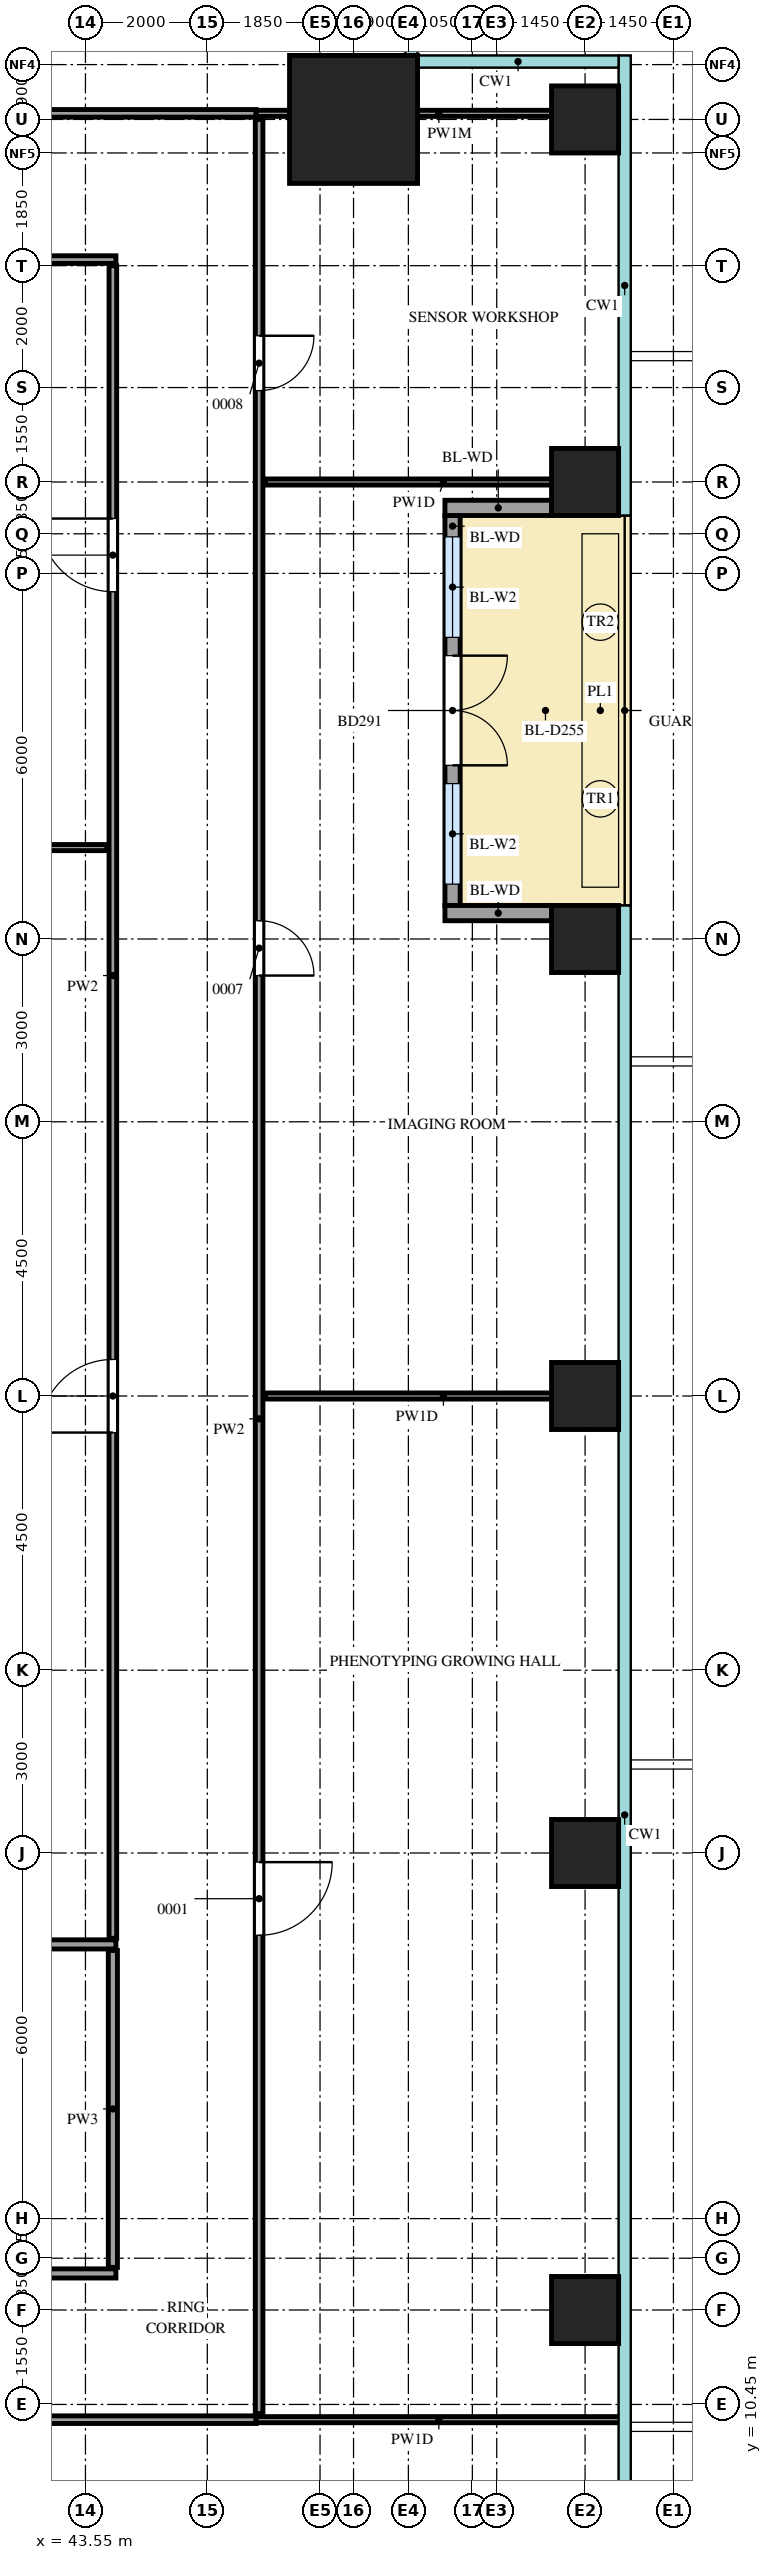
"""IFC4 building model, lengths in metres.
Left out: names, types, materials, properties, quantities, classifications, styles, units other than length and angle.
Written with IfcOpenShell. Run it as: python <this file> out.ifc"""

import sys

from ifc_helpers import new_model, si_unit, direction, frame, frame_2d, origin, origin_2d, place, context, subcontext, project, spatial, rectangle, extrude, source, transform, mapped, element, fill, save


model = new_model("IFC4")
c1 = context("Model", 3, precision=1e-05, world=origin(), true_north=direction((0.0, 1.0)))
c2 = subcontext(c1, "Body", "Model", "MODEL_VIEW")
j1 = project(units=[si_unit("LENGTHUNIT", "METRE"), si_unit("PLANEANGLEUNIT", "RADIAN")], contexts=[c1])
p1 = place(None, origin())
s1 = spatial("IfcSite", under=j1, at=p1, CompositionType="ELEMENT")
p2 = place(p1, origin())
s2 = spatial("IfcBuilding", under=s1, at=p2, CompositionType="ELEMENT")
p3 = place(p2, frame((0.0, 0.0, 136.7)))
s3 = spatial("IfcBuildingStorey", under=s2, at=p3, CompositionType="ELEMENT", Elevation=136.7)
m1 = source(origin(), c2, "Body", "SweptSolid", [
    extrude(rectangle(XDim=2.1, YDim=2.1, at=origin_2d()), origin(), (0.0, 0.0, 1.0), 4.4),
])
p4 = place(p3, frame((47.95, 47.95, 0.0), z_axis=(0.0, 0.0, 1.0), x_axis=(1.0, 0.0, 0.0)))
e1 = element("IfcColumn", 1, at=p4, inside=s3, PredefinedType="COLUMN", context=c2, shape_type="MappedRepresentation", body=[
    mapped(m1, transform((0.0, 0.0, 0.0))),
])
m2 = source(origin(), c2, "Body", "SweptSolid", [
    extrude(rectangle(XDim=1.1, YDim=1.1, at=origin_2d()), origin(), (0.0, 0.0, 1.0), 4.1),
])
for number, where, z_axis, x_axis in (
    (2, (51.75, 12.0, 0.0), (0.0, 0.0, 1.0), (1.0, 0.0, 0.0)),
    (3, (51.75, 19.5, 0.0), (0.0, 0.0, 1.0), (1.0, 0.0, 0.0)),
    (4, (51.75, 27.0, 0.0), (0.0, 0.0, 1.0), (1.0, 0.0, 0.0)),
    (5, (51.75, 34.5, 0.0), (0.0, 0.0, 1.0), (1.0, 0.0, 0.0)),
    (6, (51.75, 42.0, 0.0), (0.0, 0.0, 1.0), (1.0, 0.0, 0.0)),
    (7, (51.75, 47.95, 0.0), (0.0, 0.0, 1.0), (1.0, 0.0, 0.0)),
):
    element("IfcColumn", number, at=place(p3, frame(where, z_axis=z_axis, x_axis=x_axis)), inside=s3, PredefinedType="COLUMN", context=c2, shape_type="MappedRepresentation", body=[
        mapped(m2, transform((0.0, 0.0, 0.0))),
    ])
m3 = source(origin(), c2, "Body", "SweptSolid", [
    extrude(rectangle(XDim=6.4, YDim=0.25, at=frame_2d((3.2, 0.0))), origin(), (0.0, 0.0, 1.0), 3.55),
])
p5 = place(p3, frame((49.575, 35.05, 0.0), z_axis=(0.0, 0.0, 1.0), x_axis=(0.0, 1.0, 0.0)))
e8 = element("IfcWall", 8, at=p5, inside=s3, PredefinedType="SOLIDWALL", context=c2, shape_type="MappedRepresentation", body=[
    mapped(m3, transform((0.0, 0.0, 0.0))),
])
m4 = source(origin(), c2, "Body", "SweptSolid", [
    extrude(rectangle(XDim=1.65, YDim=2.4, at=frame_2d((0.825, 1.2))), frame((0.0, 0.135, 0.0), z_axis=(0.0, -1.0, 0.0), x_axis=(1.0, 0.0, 0.0)), (0.0, 0.0, 1.0), 0.27),
])
p6 = place(p5, frame((0.35, 0.0, 0.0)))
e9 = element("IfcOpeningElement", 9, at=p6, cuts=e8, PredefinedType="OPENING", context=c2, shape_type="MappedRepresentation", body=[
    mapped(m4, transform((0.0, 0.0, 0.0))),
])
p7 = place(p5, frame((4.4, 0.0, 0.0)))
e10 = element("IfcOpeningElement", 10, at=p7, cuts=e8, PredefinedType="OPENING", context=c2, shape_type="MappedRepresentation", body=[
    mapped(m4, transform((0.0, 0.0, 0.0))),
])
m5 = source(origin(), c2, "Body", "SweptSolid", [
    extrude(rectangle(XDim=1.8, YDim=2.4, at=frame_2d((0.9, 1.2))), frame((0.0, 0.135, 0.0), z_axis=(0.0, -1.0, 0.0), x_axis=(1.0, 0.0, 0.0)), (0.0, 0.0, 1.0), 0.27),
])
p8 = place(p5, frame((2.3, 0.0, 0.0)))
e11 = element("IfcOpeningElement", 11, at=p8, cuts=e8, PredefinedType="OPENING", context=c2, shape_type="MappedRepresentation", body=[
    mapped(m5, transform((0.0, 0.0, 0.0))),
])
m6 = source(origin(), c2, "Body", "SweptSolid", [
    extrude(rectangle(XDim=1.75, YDim=0.25, at=frame_2d((0.875, 0.0))), origin(), (0.0, 0.0, 1.0), 3.55),
])
for number, where, z_axis, x_axis in (
    (12, (51.2, 34.925, 0.0), (0.0, 0.0, 1.0), (-1.0, 0.0, 0.0)),
    (13, (51.2, 41.575, 0.0), (0.0, 0.0, 1.0), (-1.0, 0.0, 0.0)),
):
    element("IfcWall", number, at=place(p3, frame(where, z_axis=z_axis, x_axis=x_axis)), inside=s3, PredefinedType="SOLIDWALL", context=c2, shape_type="MappedRepresentation", body=[
        mapped(m6, transform((0.0, 0.0, 0.0))),
    ])
m7 = source(origin(), c2, "Body", "SweptSolid", [
    extrude(rectangle(XDim=20.0, YDim=0.125, at=frame_2d((10.0, 0.0))), origin(), (0.0, 0.0, 1.0), 4.2),
])
p9 = place(p3, frame((26.35, 10.2, 0.0), z_axis=(0.0, 0.0, 1.0), x_axis=(1.0, 0.0, 0.0)))
e14 = element("IfcWall", 14, at=p9, inside=s3, PredefinedType="PARTITIONING", context=c2, shape_type="MappedRepresentation", body=[
    mapped(m7, transform((0.0, 0.0, 0.0))),
])
m8 = source(origin(), c2, "Body", "SweptSolid", [
    extrude(rectangle(XDim=1.2, YDim=2.1, at=frame_2d((0.6, 1.05))), frame((0.0, 0.073, 0.0), z_axis=(0.0, -1.0, 0.0), x_axis=(1.0, 0.0, 0.0)), (0.0, 0.0, 1.0), 0.145),
])
p10 = place(p9, frame((3.5, 0.0, 0.0)))
e15 = element("IfcOpeningElement", 15, at=p10, cuts=e14, PredefinedType="OPENING", context=c2, shape_type="MappedRepresentation", body=[
    mapped(m8, transform((0.0, 0.0, 0.0))),
])
p11 = place(p9, frame((12.3, 0.0, 0.0)))
e16 = element("IfcOpeningElement", 16, at=p11, cuts=e14, PredefinedType="OPENING", context=c2, shape_type="MappedRepresentation", body=[
    mapped(m8, transform((0.0, 0.0, 0.0))),
])
m9 = source(origin(), c2, "Body", "SweptSolid", [
    extrude(rectangle(XDim=6.0, YDim=0.1, at=frame_2d((3.0, 0.0))), origin(), (0.0, 0.0, 1.0), 4.2),
])
p12 = place(p3, frame((46.35, 10.2, 0.0), z_axis=(0.0, 0.0, 1.0), x_axis=(1.0, 0.0, 0.0)))
e17 = element("IfcWall", 17, at=p12, inside=s3, PredefinedType="PARTITIONING", context=c2, shape_type="MappedRepresentation", body=[
    mapped(m9, transform((0.0, 0.0, 0.0))),
])
m10 = source(origin(), c2, "Body", "SweptSolid", [
    extrude(rectangle(XDim=37.65, YDim=0.125, at=frame_2d((18.825, 0.0))), origin(), (0.0, 0.0, 1.0), 4.2),
])
p13 = place(p3, frame((46.4, 10.3, 0.0), z_axis=(0.0, 0.0, 1.0), x_axis=(0.0, 1.0, 0.0)))
e18 = element("IfcWall", 18, at=p13, inside=s3, PredefinedType="PARTITIONING", context=c2, shape_type="MappedRepresentation", body=[
    mapped(m10, transform((0.0, 0.0, 0.0))),
])
p14 = place(p13, frame((7.85, 0.0, 0.0)))
e19 = element("IfcOpeningElement", 19, at=p14, cuts=e18, PredefinedType="OPENING", context=c2, shape_type="MappedRepresentation", body=[
    mapped(m8, transform((0.0, 0.0, 0.0))),
])
m11 = source(origin(), c2, "Body", "SweptSolid", [
    extrude(rectangle(XDim=0.9, YDim=2.1, at=frame_2d((0.45, 1.05))), frame((0.0, 0.073, 0.0), z_axis=(0.0, -1.0, 0.0), x_axis=(1.0, 0.0, 0.0)), (0.0, 0.0, 1.0), 0.145),
])
p15 = place(p13, frame((23.6, 0.0, 0.0)))
e20 = element("IfcOpeningElement", 20, at=p15, cuts=e18, PredefinedType="OPENING", context=c2, shape_type="MappedRepresentation", body=[
    mapped(m11, transform((0.0, 0.0, 0.0))),
])
p16 = place(p13, frame((33.2, 0.0, 0.0)))
e21 = element("IfcOpeningElement", 21, at=p16, cuts=e18, PredefinedType="OPENING", context=c2, shape_type="MappedRepresentation", body=[
    mapped(m11, transform((0.0, 0.0, 0.0))),
])
m12 = source(origin(), c2, "Body", "SweptSolid", [
    extrude(rectangle(XDim=17.7, YDim=0.15, at=frame_2d((8.85, 0.0))), origin(), (0.0, 0.0, 1.0), 4.2),
])
p17 = place(p3, frame((26.35, 12.6, 0.0), z_axis=(0.0, 0.0, 1.0), x_axis=(1.0, 0.0, 0.0)))
e22 = element("IfcWall", 22, at=p17, inside=s3, PredefinedType="PARTITIONING", context=c2, shape_type="MappedRepresentation", body=[
    mapped(m12, transform((0.0, 0.0, 0.0))),
])
m13 = source(origin(), c2, "Body", "SweptSolid", [
    extrude(rectangle(XDim=5.2, YDim=0.15, at=frame_2d((2.6, 0.0))), origin(), (0.0, 0.0, 1.0), 4.2),
])
p18 = place(p3, frame((44.0, 12.7, 0.0), z_axis=(0.0, 0.0, 1.0), x_axis=(0.0, 1.0, 0.0)))
e23 = element("IfcWall", 23, at=p18, inside=s3, PredefinedType="PARTITIONING", context=c2, shape_type="MappedRepresentation", body=[
    mapped(m13, transform((0.0, 0.0, 0.0))),
])
p19 = place(p3, frame((26.35, 18.0, 0.0), z_axis=(0.0, 0.0, 1.0), x_axis=(1.0, 0.0, 0.0)))
e24 = element("IfcWall", 24, at=p19, inside=s3, PredefinedType="PARTITIONING", context=c2, shape_type="MappedRepresentation", body=[
    mapped(m12, transform((0.0, 0.0, 0.0))),
])
m14 = source(origin(), c2, "Body", "SweptSolid", [
    extrude(rectangle(XDim=27.45, YDim=0.125, at=frame_2d((13.725, 0.0))), origin(), (0.0, 0.0, 1.0), 4.2),
])
p20 = place(p3, frame((44.0, 18.1, 0.0), z_axis=(0.0, 0.0, 1.0), x_axis=(0.0, 1.0, 0.0)))
e25 = element("IfcWall", 25, at=p20, inside=s3, PredefinedType="PARTITIONING", context=c2, shape_type="MappedRepresentation", body=[
    mapped(m14, transform((0.0, 0.0, 0.0))),
])
p21 = place(p20, frame((8.3, 0.0, 0.0)))
e26 = element("IfcOpeningElement", 26, at=p21, cuts=e25, PredefinedType="OPENING", context=c2, shape_type="MappedRepresentation", body=[
    mapped(m8, transform((0.0, 0.0, 0.0))),
])
p22 = place(p20, frame((22.1, 0.0, 0.0)))
e27 = element("IfcOpeningElement", 27, at=p22, cuts=e25, PredefinedType="OPENING", context=c2, shape_type="MappedRepresentation", body=[
    mapped(m8, transform((0.0, 0.0, 0.0))),
])
m15 = source(origin(), c2, "Body", "SweptSolid", [
    extrude(rectangle(XDim=5.85, YDim=0.1, at=frame_2d((2.925, 0.0))), origin(), (0.0, 0.0, 1.0), 4.2),
])
p23 = place(p3, frame((46.5, 27.0, 0.0), z_axis=(0.0, 0.0, 1.0), x_axis=(1.0, 0.0, 0.0)))
e28 = element("IfcWall", 28, at=p23, inside=s3, PredefinedType="PARTITIONING", context=c2, shape_type="MappedRepresentation", body=[
    mapped(m15, transform((0.0, 0.0, 0.0))),
])
m16 = source(origin(), c2, "Body", "SweptSolid", [
    extrude(rectangle(XDim=13.35, YDim=0.1, at=frame_2d((6.675, 0.0))), origin(), (0.0, 0.0, 1.0), 4.2),
])
p24 = place(p3, frame((30.55, 36.0, 0.0), z_axis=(0.0, 0.0, 1.0), x_axis=(1.0, 0.0, 0.0)))
e29 = element("IfcWall", 29, at=p24, inside=s3, PredefinedType="PARTITIONING", context=c2, shape_type="MappedRepresentation", body=[
    mapped(m16, transform((0.0, 0.0, 0.0))),
])
p25 = place(p3, frame((46.5, 42.0, 0.0), z_axis=(0.0, 0.0, 1.0), x_axis=(1.0, 0.0, 0.0)))
e30 = element("IfcWall", 30, at=p25, inside=s3, PredefinedType="PARTITIONING", context=c2, shape_type="MappedRepresentation", body=[
    mapped(m15, transform((0.0, 0.0, 0.0))),
])
m17 = source(origin(), c2, "Body", "SweptSolid", [
    extrude(rectangle(XDim=13.5, YDim=0.125, at=frame_2d((6.75, 0.0))), origin(), (0.0, 0.0, 1.0), 4.2),
])
p26 = place(p3, frame((30.55, 45.65, 0.0), z_axis=(0.0, 0.0, 1.0), x_axis=(1.0, 0.0, 0.0)))
e31 = element("IfcWall", 31, at=p26, inside=s3, PredefinedType="PARTITIONING", context=c2, shape_type="MappedRepresentation", body=[
    mapped(m17, transform((0.0, 0.0, 0.0))),
])
m18 = source(origin(), c2, "Body", "SweptSolid", [
    extrude(rectangle(XDim=42.2, YDim=0.125, at=frame_2d((21.1, 0.0))), origin(), (0.0, 0.0, 1.0), 3.55),
])
p27 = place(p3, frame((4.15, 48.05, 0.0), z_axis=(0.0, 0.0, 1.0), x_axis=(1.0, 0.0, 0.0)))
e32 = element("IfcWall", 32, at=p27, inside=s3, PredefinedType="PARTITIONING", context=c2, shape_type="MappedRepresentation", body=[
    mapped(m18, transform((0.0, 0.0, 0.0))),
])
p28 = place(p27, frame((11.0, 0.0, 0.0)))
e33 = element("IfcOpeningElement", 33, at=p28, cuts=e32, PredefinedType="OPENING", context=c2, shape_type="MappedRepresentation", body=[
    mapped(m11, transform((0.0, 0.0, 0.0))),
])
p29 = place(p27, frame((32.1, 0.0, 0.0)))
e34 = element("IfcOpeningElement", 34, at=p29, cuts=e32, PredefinedType="OPENING", context=c2, shape_type="MappedRepresentation", body=[
    mapped(m11, transform((0.0, 0.0, 0.0))),
])
m19 = source(origin(), c2, "Body", "SweptSolid", [
    extrude(rectangle(XDim=6.0, YDim=0.1, at=frame_2d((3.0, 0.0))), origin(), (0.0, 0.0, 1.0), 3.55),
])
p30 = place(p3, frame((46.35, 48.05, 0.0), z_axis=(0.0, 0.0, 1.0), x_axis=(1.0, 0.0, 0.0)))
e35 = element("IfcWall", 35, at=p30, inside=s3, PredefinedType="PARTITIONING", context=c2, shape_type="MappedRepresentation", body=[
    mapped(m19, transform((0.0, 0.0, 0.0))),
])
m20 = source(origin(), c2, "Body", "SweptSolid", [
    extrude(rectangle(XDim=1.65, YDim=2.4, at=frame_2d((0.825, 1.2))), frame((0.0, 0.03, 0.0), z_axis=(0.0, -1.0, 0.0), x_axis=(1.0, 0.0, 0.0)), (0.0, 0.0, 1.0), 0.06),
])
p31 = place(p6, origin())
e36 = element("IfcWindow", 36, at=p31, inside=s3, PartitioningType="SINGLE_PANEL", PredefinedType="WINDOW", context=c2, shape_type="MappedRepresentation", body=[
    mapped(m20, transform((0.0, 0.0, 0.0))),
])
fill(e9, e36)
p32 = place(p7, origin())
e37 = element("IfcWindow", 37, at=p32, inside=s3, PartitioningType="SINGLE_PANEL", PredefinedType="WINDOW", context=c2, shape_type="MappedRepresentation", body=[
    mapped(m20, transform((0.0, 0.0, 0.0))),
])
fill(e10, e37)
m21 = source(origin(), c2, "Body", "SweptSolid", [
    extrude(rectangle(XDim=1.8, YDim=2.4, at=frame_2d((0.9, 1.2))), frame((0.0, 0.025, 0.0), z_axis=(0.0, -1.0, 0.0), x_axis=(1.0, 0.0, 0.0)), (0.0, 0.0, 1.0), 0.05),
])
p33 = place(p8, origin())
e38 = element("IfcDoor", 38, at=p33, inside=s3, OperationType="DOUBLE_DOOR_DOUBLE_SWING", PredefinedType="DOOR", context=c2, shape_type="MappedRepresentation", body=[
    mapped(m21, transform((0.0, 0.0, 0.0))),
])
fill(e11, e38)
m22 = source(origin(), c2, "Body", "SweptSolid", [
    extrude(rectangle(XDim=1.2, YDim=2.1, at=frame_2d((0.6, 1.05))), frame((0.0, 0.025, 0.0), z_axis=(0.0, -1.0, 0.0), x_axis=(1.0, 0.0, 0.0)), (0.0, 0.0, 1.0), 0.05),
])
p34 = place(p21, origin())
e39 = element("IfcDoor", 39, at=p34, inside=s3, OperationType="SINGLE_SWING_RIGHT", PredefinedType="DOOR", context=c2, shape_type="MappedRepresentation", body=[
    mapped(m22, transform((0.0, 0.0, 0.0))),
])
fill(e26, e39)
p35 = place(p22, origin())
e40 = element("IfcDoor", 40, at=p35, inside=s3, OperationType="SINGLE_SWING_LEFT", PredefinedType="DOOR", context=c2, shape_type="MappedRepresentation", body=[
    mapped(m22, transform((0.0, 0.0, 0.0))),
])
fill(e27, e40)
p36 = place(p14, origin())
e41 = element("IfcDoor", 41, at=p36, inside=s3, OperationType="SINGLE_SWING_RIGHT", PredefinedType="DOOR", context=c2, shape_type="MappedRepresentation", body=[
    mapped(m22, transform((0.0, 0.0, 0.0))),
])
fill(e19, e41)
m23 = source(origin(), c2, "Body", "SweptSolid", [
    extrude(rectangle(XDim=0.9, YDim=2.1, at=frame_2d((0.45, 1.05))), frame((0.0, 0.025, 0.0), z_axis=(0.0, -1.0, 0.0), x_axis=(1.0, 0.0, 0.0)), (0.0, 0.0, 1.0), 0.05),
])
p37 = place(p15, origin())
e42 = element("IfcDoor", 42, at=p37, inside=s3, OperationType="SINGLE_SWING_LEFT", PredefinedType="DOOR", context=c2, shape_type="MappedRepresentation", body=[
    mapped(m23, transform((0.0, 0.0, 0.0))),
])
fill(e20, e42)
p38 = place(p16, origin())
e43 = element("IfcDoor", 43, at=p38, inside=s3, OperationType="SINGLE_SWING_RIGHT", PredefinedType="DOOR", context=c2, shape_type="MappedRepresentation", body=[
    mapped(m23, transform((0.0, 0.0, 0.0))),
])
fill(e21, e43)
save(model, sys.argv[1])
